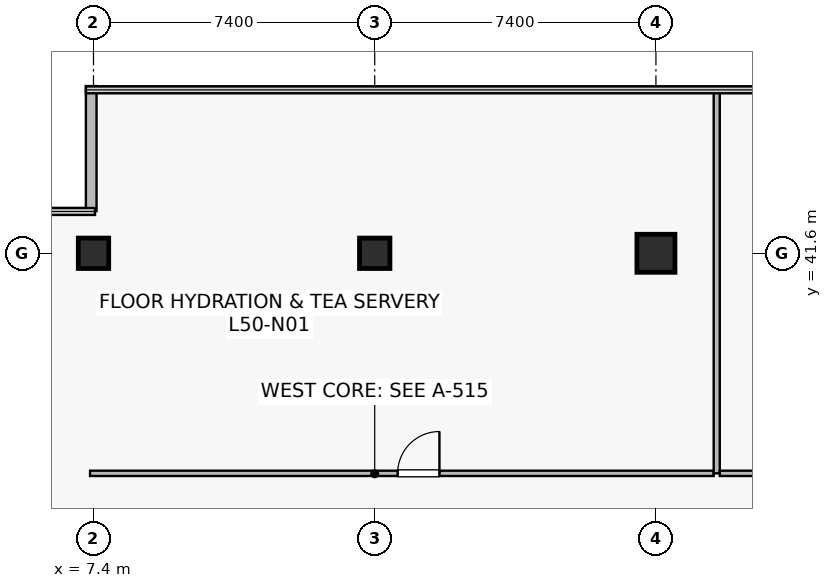
"""IFC4 building model, lengths in metres.
Left out: names, types, materials, properties, quantities, classifications, styles, units other than length and angle.
Written with IfcOpenShell. Run it as: python <this file> out.ifc"""

import sys

from ifc_helpers import new_model, si_unit, direction, frame, frame_2d, origin, origin_2d, place, context, subcontext, project, spatial, rectangle, extrude, source, transform, mapped, element, fill, save


model = new_model("IFC4")
c1 = context("Model", 3, precision=1e-05, world=origin(), true_north=direction((0.0, 1.0)))
c2 = subcontext(c1, "Body", "Model", "MODEL_VIEW")
j1 = project(units=[si_unit("LENGTHUNIT", "METRE"), si_unit("PLANEANGLEUNIT", "RADIAN")], contexts=[c1])
p1 = place(None, origin())
s1 = spatial("IfcSite", under=j1, at=p1, CompositionType="ELEMENT")
p2 = place(p1, origin())
s2 = spatial("IfcBuilding", under=s1, at=p2, CompositionType="ELEMENT")
p3 = place(p2, frame((0.0, 0.0, 209.6)))
s3 = spatial("IfcBuildingStorey", under=s2, at=p3, CompositionType="ELEMENT", Elevation=209.6)
m1 = source(origin(), c2, "Body", "SweptSolid", [
    extrude(rectangle(XDim=0.8, YDim=0.8, at=origin_2d()), origin(), (0.0, 0.0, 1.0), 4.1),
])
p4 = place(p3, frame((14.8, 41.6, 0.0), z_axis=(0.0, 0.0, 1.0), x_axis=(1.0, 0.0, 0.0)))
e1 = element("IfcColumn", 1, at=p4, inside=s3, PredefinedType="COLUMN", context=c2, shape_type="MappedRepresentation", body=[
    mapped(m1, transform((0.0, 0.0, 0.0), scale=1.0)),
])
m2 = source(origin(), c2, "Body", "SweptSolid", [
    extrude(rectangle(XDim=1.0, YDim=1.0, at=origin_2d()), origin(), (0.0, 0.0, 1.0), 4.1),
])
p5 = place(p3, frame((22.2, 41.6, 0.0), z_axis=(0.0, 0.0, 1.0), x_axis=(1.0, 0.0, 0.0)))
e2 = element("IfcColumn", 2, at=p5, inside=s3, PredefinedType="COLUMN", context=c2, shape_type="MappedRepresentation", body=[
    mapped(m2, transform((0.0, 0.0, 0.0), scale=1.0)),
])
p6 = place(p3, frame((7.4, 41.6, 0.0), z_axis=(0.0, 0.0, 1.0), x_axis=(1.0, 0.0, 0.0)))
e3 = element("IfcColumn", 3, at=p6, inside=s3, PredefinedType="COLUMN", context=c2, shape_type="MappedRepresentation", body=[
    mapped(m1, transform((0.0, 0.0, 0.0), scale=1.0)),
])
p7 = place(p3, frame((7.34, 46.0, 0.0), z_axis=(0.0, 0.0, 1.0), x_axis=(0.0, -1.0, 0.0)))
e4 = element("IfcWall", 4, at=p7, inside=s3, PredefinedType="STANDARD", context=c2, shape_type="SweptSolid", body=[
    extrude(rectangle(XDim=3.288, YDim=0.28, at=frame_2d((1.644, 0.0))), origin(), (0.0, 0.0, 1.0), 3.8),
])
p8 = place(p3, frame((7.31, 35.81, 0.0), z_axis=(0.0, 0.0, 1.0), x_axis=(1.0, 0.0, 0.0)))
e5 = element("IfcWall", 5, at=p8, inside=s3, PredefinedType="PARTITIONING", context=c2, shape_type="SweptSolid", body=[
    extrude(rectangle(XDim=16.41, YDim=0.14, at=frame_2d((8.205, 0.0))), origin(), (0.0, 0.0, 1.0), 3.197),
])
p9 = place(p8, frame((8.093, 0.0, 0.0)))
e6 = element("IfcOpeningElement", 6, at=p9, cuts=e5, PredefinedType="OPENING", context=c2, shape_type="SweptSolid", body=[
    extrude(rectangle(XDim=1.1, YDim=2.18, at=frame_2d((0.55, 1.09))), frame((0.0, 0.08, 0.0), z_axis=(0.0, -1.0, 0.0), x_axis=(1.0, 0.0, 0.0)), (0.0, 0.0, 1.0), 0.16),
])
p10 = place(p3, frame((23.8, 35.81, 0.0), z_axis=(0.0, 0.0, 1.0), x_axis=(0.0, 1.0, 0.0)))
e7 = element("IfcWall", 7, at=p10, inside=s3, PredefinedType="PARTITIONING", context=c2, shape_type="SweptSolid", body=[
    extrude(rectangle(XDim=10.08, YDim=0.16, at=frame_2d((5.04, 0.0))), origin(), (0.0, 0.0, 1.0), 3.135),
])
p11 = place(p3, frame((23.88, 35.81, 0.0), z_axis=(0.0, 0.0, 1.0), x_axis=(1.0, 0.0, 0.0)))
e8 = element("IfcWall", 8, at=p11, inside=s3, PredefinedType="PARTITIONING", context=c2, shape_type="SweptSolid", body=[
    extrude(rectangle(XDim=23.64, YDim=0.14, at=frame_2d((11.82, 0.0))), origin(), (0.0, 0.0, 1.0), 3.197),
])
p12 = place(p11, frame((9.304, 0.0, 0.0)))
e9 = element("IfcOpeningElement", 9, at=p12, cuts=e8, PredefinedType="OPENING", context=c2, shape_type="SweptSolid", body=[
    extrude(rectangle(XDim=1.1, YDim=2.18, at=frame_2d((0.55, 1.09))), frame((0.0, 0.08, 0.0), z_axis=(0.0, -1.0, 0.0), x_axis=(1.0, 0.0, 0.0)), (0.0, 0.0, 1.0), 0.16),
])
m3 = source(origin(), c2, "Body", "SweptSolid", [
    extrude(rectangle(XDim=1.1, YDim=2.18, at=frame_2d((0.55, 1.09))), frame((0.0, 0.025, 0.0), z_axis=(0.0, -1.0, 0.0), x_axis=(1.0, 0.0, 0.0)), (0.0, 0.0, 1.0), 0.05),
])
p13 = place(p9, origin())
e10 = element("IfcDoor", 10, at=p13, inside=s3, OperationType="SINGLE_SWING_RIGHT", PredefinedType="DOOR", context=c2, shape_type="MappedRepresentation", body=[
    mapped(m3, transform((0.0, 0.0, 0.0), scale=1.0)),
])
fill(e6, e10)
save(model, sys.argv[1])
